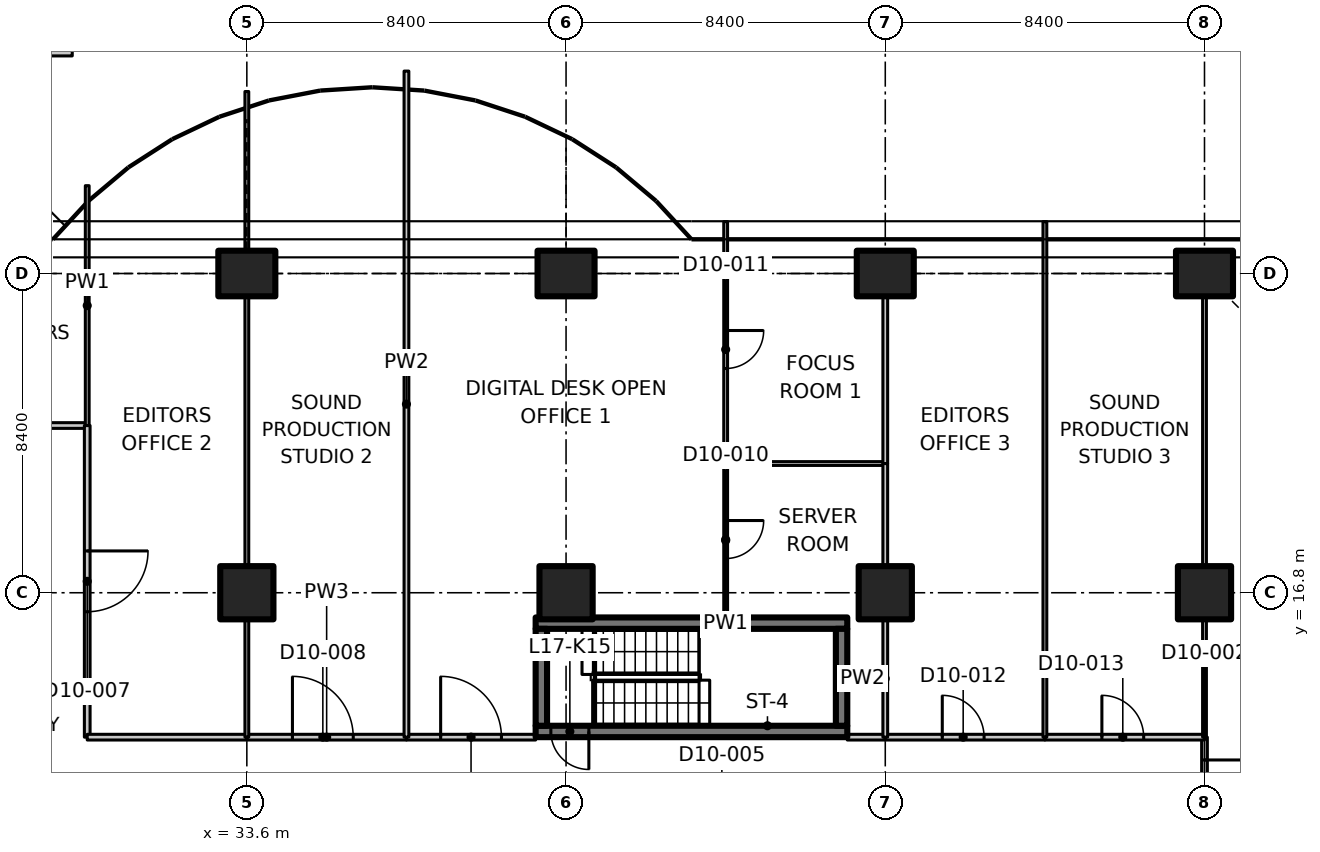
"""IFC4 building model, lengths in metres.
Left out: names, types, materials, properties, quantities, classifications, styles, units other than length and angle.
Written with IfcOpenShell. Run it as: python <this file> out.ifc"""

import sys

from ifc_helpers import new_model, si_unit, direction, frame, frame_2d, origin, origin_2d, place, context, subcontext, project, spatial, polyline, rectangle, outline, extrude, element, fill, save


model = new_model("IFC4")
c1 = context("Model", 3, precision=1e-05, world=origin(), true_north=direction((0.0, 1.0)))
c2 = subcontext(c1, "Body", "Model", "MODEL_VIEW")
j1 = project(units=[si_unit("LENGTHUNIT", "METRE"), si_unit("PLANEANGLEUNIT", "RADIAN")], contexts=[c1])
p1 = place(None, origin())
s1 = spatial("IfcSite", under=j1, at=p1, CompositionType="ELEMENT")
p2 = place(p1, origin())
s2 = spatial("IfcBuilding", under=s1, at=p2, CompositionType="ELEMENT")
p3 = place(p2, frame((0.0, 0.0, 76.1)))
s3 = spatial("IfcBuildingStorey", under=s2, at=p3, CompositionType="ELEMENT", Elevation=76.1)
p4 = place(p3, frame((33.6, 16.8, 0.0), z_axis=(0.0, 0.0, 1.0), x_axis=(1.0, 0.0, 0.0)))
e1 = element("IfcColumn", 1, at=p4, inside=s3, PredefinedType="COLUMN", context=c2, shape_type="SweptSolid", body=[
    extrude(rectangle(XDim=1.4, YDim=1.4, at=origin_2d()), origin(), (0.0, 0.0, 1.0), 3.35),
])
p5 = place(p3, frame((33.6, 25.2, 0.0), z_axis=(0.0, 0.0, 1.0), x_axis=(0.0, 1.0, 0.0)))
e2 = element("IfcColumn", 2, at=p5, inside=s3, PredefinedType="COLUMN", context=c2, shape_type="SweptSolid", body=[
    extrude(rectangle(XDim=1.2, YDim=1.5, at=origin_2d()), origin(), (0.0, 0.0, 1.0), 3.35),
])
p6 = place(p3, frame((42.0, 16.8, 0.0), z_axis=(0.0, 0.0, 1.0), x_axis=(1.0, 0.0, 0.0)))
e3 = element("IfcColumn", 3, at=p6, inside=s3, PredefinedType="COLUMN", context=c2, shape_type="SweptSolid", body=[
    extrude(rectangle(XDim=1.4, YDim=1.4, at=origin_2d()), origin(), (0.0, 0.0, 1.0), 3.35),
])
p7 = place(p3, frame((42.0, 25.2, 0.0), z_axis=(0.0, 0.0, 1.0), x_axis=(0.0, 1.0, 0.0)))
e4 = element("IfcColumn", 4, at=p7, inside=s3, PredefinedType="COLUMN", context=c2, shape_type="SweptSolid", body=[
    extrude(rectangle(XDim=1.2, YDim=1.5, at=origin_2d()), origin(), (0.0, 0.0, 1.0), 3.35),
])
p8 = place(p3, frame((50.4, 16.8, 0.0), z_axis=(0.0, 0.0, 1.0), x_axis=(1.0, 0.0, 0.0)))
e5 = element("IfcColumn", 5, at=p8, inside=s3, PredefinedType="COLUMN", context=c2, shape_type="SweptSolid", body=[
    extrude(rectangle(XDim=1.4, YDim=1.4, at=origin_2d()), origin(), (0.0, 0.0, 1.0), 3.35),
])
p9 = place(p3, frame((50.4, 25.2, 0.0), z_axis=(0.0, 0.0, 1.0), x_axis=(0.0, 1.0, 0.0)))
e6 = element("IfcColumn", 6, at=p9, inside=s3, PredefinedType="COLUMN", context=c2, shape_type="SweptSolid", body=[
    extrude(rectangle(XDim=1.2, YDim=1.5, at=origin_2d()), origin(), (0.0, 0.0, 1.0), 3.35),
])
p10 = place(p3, frame((58.8, 16.8, 0.0), z_axis=(0.0, 0.0, 1.0), x_axis=(1.0, 0.0, 0.0)))
e7 = element("IfcColumn", 7, at=p10, inside=s3, PredefinedType="COLUMN", context=c2, shape_type="SweptSolid", body=[
    extrude(rectangle(XDim=1.4, YDim=1.4, at=origin_2d()), origin(), (0.0, 0.0, 1.0), 3.35),
])
p11 = place(p3, frame((58.8, 25.2, 0.0), z_axis=(0.0, 0.0, 1.0), x_axis=(0.0, 1.0, 0.0)))
e8 = element("IfcColumn", 8, at=p11, inside=s3, PredefinedType="COLUMN", context=c2, shape_type="SweptSolid", body=[
    extrude(rectangle(XDim=1.2, YDim=1.5, at=origin_2d()), origin(), (0.0, 0.0, 1.0), 3.35),
])
p12 = place(p3, frame((49.4, 13.15, 0.0), z_axis=(0.0, 0.0, 1.0), x_axis=(-1.0, 0.0, 0.0)))
e9 = element("IfcWall", 9, at=p12, inside=s3, PredefinedType="SHEAR", context=c2, shape_type="SweptSolid", body=[
    extrude(rectangle(XDim=8.2, YDim=0.3, at=frame_2d((4.1, 0.0))), origin(), (0.0, 0.0, 1.0), 3.35),
])
p13 = place(p12, frame((6.8, 0.0, 0.0)))
e10 = element("IfcOpeningElement", 10, at=p13, cuts=e9, PredefinedType="OPENING", context=c2, shape_type="SweptSolid", body=[
    extrude(rectangle(XDim=1.0, YDim=2.1, at=frame_2d((0.5, 1.05))), frame((0.0, 0.16, 0.0), z_axis=(0.0, -1.0, 0.0), x_axis=(1.0, 0.0, 0.0)), (0.0, 0.0, 1.0), 0.32),
])
p14 = place(p3, frame((41.2, 16.0, 0.0), z_axis=(0.0, 0.0, 1.0), x_axis=(1.0, 0.0, 0.0)))
e11 = element("IfcWall", 11, at=p14, inside=s3, PredefinedType="SHEAR", context=c2, shape_type="SweptSolid", body=[
    extrude(rectangle(XDim=8.2, YDim=0.3, at=frame_2d((4.1, 0.0))), origin(), (0.0, 0.0, 1.0), 3.35),
])
for number, where, z_axis, x_axis in (
    (12, (41.35, 13.3, 0.0), (0.0, 0.0, 1.0), (0.0, 1.0, 0.0)),
    (13, (49.25, 13.3, 0.0), (0.0, 0.0, 1.0), (0.0, 1.0, 0.0)),
):
    element("IfcWall", number, at=place(p3, frame(where, z_axis=z_axis, x_axis=x_axis)), inside=s3, PredefinedType="SHEAR", context=c2, shape_type="SweptSolid", body=[
        extrude(rectangle(XDim=2.55, YDim=0.3, at=frame_2d((1.275, 0.0))), origin(), (0.0, 0.0, 1.0), 3.35),
    ])
p15 = place(p3, frame((25.2, 21.2, 0.0), z_axis=(0.0, 0.0, 1.0), x_axis=(1.0, 0.0, 0.0)))
e14 = element("IfcWall", 14, at=p15, inside=s3, PredefinedType="PARTITIONING", context=c2, shape_type="SweptSolid", body=[
    extrude(rectangle(XDim=4.2, YDim=0.15, at=frame_2d((2.1, 0.0))), origin(), (0.0, 0.0, 1.0), 3.33),
])
p16 = place(p3, frame((29.4, 21.2, 0.0), z_axis=(0.0, 0.0, 1.0), x_axis=(0.0, -1.0, 0.0)))
e15 = element("IfcWall", 15, at=p16, inside=s3, PredefinedType="PARTITIONING", context=c2, shape_type="SweptSolid", body=[
    extrude(rectangle(XDim=8.2, YDim=0.15, at=frame_2d((4.1, 0.0))), origin(), (0.0, 0.0, 1.0), 3.33),
])
p17 = place(p16, frame((3.3, 0.0, 0.0)))
e16 = element("IfcOpeningElement", 16, at=p17, cuts=e15, PredefinedType="OPENING", context=c2, shape_type="SweptSolid", body=[
    extrude(rectangle(XDim=1.6, YDim=2.1, at=frame_2d((0.8, 1.05))), frame((0.0, 0.085, 0.0), z_axis=(0.0, -1.0, 0.0), x_axis=(1.0, 0.0, 0.0)), (0.0, 0.0, 1.0), 0.17),
])
p18 = place(p3, frame((29.4, 27.511, 0.0), z_axis=(0.0, 0.0, 1.0), x_axis=(0.0, -1.0, 0.0)))
e17 = element("IfcWall", 17, at=p18, inside=s3, PredefinedType="PARTITIONING", context=c2, shape_type="SweptSolid", body=[
    extrude(outline(polyline([(0.0, 0.0), (6.311, 0.0), (6.311, 3.33), (2.761, 3.33), (2.759, 2.98), (1.863, 2.98), (1.861, 3.33), (0.236, 3.33), (0.0, 3.33), (0.0, 0.0)])), frame((0.0, 0.05, 0.0), z_axis=(0.0, -1.0, 0.0), x_axis=(1.0, 0.0, 0.0)), (0.0, 0.0, 1.0), 0.1),
])
p19 = place(p3, frame((25.2, 31.0, 0.0), z_axis=(0.0, 0.0, 1.0), x_axis=(1.0, 0.0, 0.0)))
e18 = element("IfcWall", 18, at=p19, inside=s3, PredefinedType="PARTITIONING", context=c2, shape_type="SweptSolid", body=[
    extrude(rectangle(XDim=3.806, YDim=0.15, at=frame_2d((1.903, 0.0))), origin(), (0.0, 0.0, 1.0), 2.98),
])
p20 = place(p3, frame((58.8, 13.0, 0.0), z_axis=(0.0, 0.0, 1.0), x_axis=(0.0, -1.0, 0.0)))
e19 = element("IfcWall", 19, at=p20, inside=s3, PredefinedType="PARTITIONING", context=c2, shape_type="SweptSolid", body=[
    extrude(rectangle(XDim=3.4, YDim=0.15, at=frame_2d((1.7, 0.0))), origin(), (0.0, 0.0, 1.0), 3.33),
])
p21 = place(p20, frame((0.6, 0.0, 0.0)))
e20 = element("IfcOpeningElement", 20, at=p21, cuts=e19, PredefinedType="OPENING", context=c2, shape_type="SweptSolid", body=[
    extrude(rectangle(XDim=2.0, YDim=2.4, at=frame_2d((1.0, 1.2))), frame((0.0, 0.085, 0.0), z_axis=(0.0, -1.0, 0.0), x_axis=(1.0, 0.0, 0.0)), (0.0, 0.0, 1.0), 0.17),
])
p22 = place(p3, frame((29.4, 13.0, 0.0), z_axis=(0.0, 0.0, 1.0), x_axis=(1.0, 0.0, 0.0)))
e21 = element("IfcWall", 21, at=p22, inside=s3, PredefinedType="PARTITIONING", context=c2, shape_type="SweptSolid", body=[
    extrude(rectangle(XDim=4.2, YDim=0.15, at=frame_2d((2.1, 0.0))), origin(), (0.0, 0.0, 1.0), 3.33),
])
p23 = place(p3, frame((33.6, 13.0, 0.0), z_axis=(0.0, 0.0, 1.0), x_axis=(1.0, 0.0, 0.0)))
e22 = element("IfcWall", 22, at=p23, inside=s3, PredefinedType="PARTITIONING", context=c2, shape_type="SweptSolid", body=[
    extrude(rectangle(XDim=4.2, YDim=0.15, at=frame_2d((2.1, 0.0))), origin(), (0.0, 0.0, 1.0), 3.33),
])
p24 = place(p23, frame((1.2, 0.0, 0.0)))
e23 = element("IfcOpeningElement", 23, at=p24, cuts=e22, PredefinedType="OPENING", context=c2, shape_type="SweptSolid", body=[
    extrude(rectangle(XDim=1.6, YDim=2.1, at=frame_2d((0.8, 1.05))), frame((0.0, 0.085, 0.0), z_axis=(0.0, -1.0, 0.0), x_axis=(1.0, 0.0, 0.0)), (0.0, 0.0, 1.0), 0.17),
])
p25 = place(p3, frame((37.8, 13.0, 0.0), z_axis=(0.0, 0.0, 1.0), x_axis=(1.0, 0.0, 0.0)))
e24 = element("IfcWall", 24, at=p25, inside=s3, PredefinedType="PARTITIONING", context=c2, shape_type="SweptSolid", body=[
    extrude(rectangle(XDim=3.4, YDim=0.15, at=frame_2d((1.7, 0.0))), origin(), (0.0, 0.0, 1.0), 3.33),
])
p26 = place(p25, frame((0.9, 0.0, 0.0)))
e25 = element("IfcOpeningElement", 25, at=p26, cuts=e24, PredefinedType="OPENING", context=c2, shape_type="SweptSolid", body=[
    extrude(rectangle(XDim=1.6, YDim=2.1, at=frame_2d((0.8, 1.05))), frame((0.0, 0.085, 0.0), z_axis=(0.0, -1.0, 0.0), x_axis=(1.0, 0.0, 0.0)), (0.0, 0.0, 1.0), 0.17),
])
p27 = place(p3, frame((49.4, 13.0, 0.0), z_axis=(0.0, 0.0, 1.0), x_axis=(1.0, 0.0, 0.0)))
e26 = element("IfcWall", 26, at=p27, inside=s3, PredefinedType="PARTITIONING", context=c2, shape_type="SweptSolid", body=[
    extrude(rectangle(XDim=1.0, YDim=0.15, at=frame_2d((0.5, 0.0))), origin(), (0.0, 0.0, 1.0), 3.33),
])
p28 = place(p3, frame((50.4, 13.0, 0.0), z_axis=(0.0, 0.0, 1.0), x_axis=(1.0, 0.0, 0.0)))
e27 = element("IfcWall", 27, at=p28, inside=s3, PredefinedType="PARTITIONING", context=c2, shape_type="SweptSolid", body=[
    extrude(rectangle(XDim=4.2, YDim=0.15, at=frame_2d((2.1, 0.0))), origin(), (0.0, 0.0, 1.0), 3.33),
])
p29 = place(p28, frame((1.5, 0.0, 0.0)))
e28 = element("IfcOpeningElement", 28, at=p29, cuts=e27, PredefinedType="OPENING", context=c2, shape_type="SweptSolid", body=[
    extrude(rectangle(XDim=1.1, YDim=2.1, at=frame_2d((0.55, 1.05))), frame((0.0, 0.085, 0.0), z_axis=(0.0, -1.0, 0.0), x_axis=(1.0, 0.0, 0.0)), (0.0, 0.0, 1.0), 0.17),
])
p30 = place(p3, frame((54.6, 13.0, 0.0), z_axis=(0.0, 0.0, 1.0), x_axis=(1.0, 0.0, 0.0)))
e29 = element("IfcWall", 29, at=p30, inside=s3, PredefinedType="PARTITIONING", context=c2, shape_type="SweptSolid", body=[
    extrude(rectangle(XDim=4.2, YDim=0.15, at=frame_2d((2.1, 0.0))), origin(), (0.0, 0.0, 1.0), 3.33),
])
p31 = place(p30, frame((1.5, 0.0, 0.0)))
e30 = element("IfcOpeningElement", 30, at=p31, cuts=e29, PredefinedType="OPENING", context=c2, shape_type="SweptSolid", body=[
    extrude(rectangle(XDim=1.1, YDim=2.1, at=frame_2d((0.55, 1.05))), frame((0.0, 0.085, 0.0), z_axis=(0.0, -1.0, 0.0), x_axis=(1.0, 0.0, 0.0)), (0.0, 0.0, 1.0), 0.17),
])
p32 = place(p3, frame((58.8, 13.0, 0.0), z_axis=(0.0, 0.0, 1.0), x_axis=(0.0, 1.0, 0.0)))
e31 = element("IfcWall", 31, at=p32, inside=s3, PredefinedType="PARTITIONING", context=c2, shape_type="SweptSolid", body=[
    extrude(rectangle(XDim=3.08, YDim=0.1, at=frame_2d((1.54, 0.0))), origin(), (0.0, 0.0, 1.0), 3.33),
])
p33 = place(p3, frame((58.8, 17.52, 0.0), z_axis=(0.0, 0.0, 1.0), x_axis=(0.0, 1.0, 0.0)))
e32 = element("IfcWall", 32, at=p33, inside=s3, PredefinedType="PARTITIONING", context=c2, shape_type="SweptSolid", body=[
    extrude(rectangle(XDim=7.06, YDim=0.1, at=frame_2d((3.53, 0.0))), origin(), (0.0, 0.0, 1.0), 3.33),
])
p34 = place(p3, frame((33.6, 29.988, 0.0), z_axis=(0.0, 0.0, 1.0), x_axis=(0.0, -1.0, 0.0)))
e33 = element("IfcWall", 33, at=p34, inside=s3, PredefinedType="PARTITIONING", context=c2, shape_type="SweptSolid", body=[
    extrude(rectangle(XDim=4.168, YDim=0.1, at=frame_2d((2.084, 0.0))), origin(), (0.0, 0.0, 1.0), 2.98),
])
p35 = place(p3, frame((33.6, 24.58, 0.0), z_axis=(0.0, 0.0, 1.0), x_axis=(0.0, -1.0, 0.0)))
e34 = element("IfcWall", 34, at=p35, inside=s3, PredefinedType="PARTITIONING", context=c2, shape_type="SweptSolid", body=[
    extrude(rectangle(XDim=7.06, YDim=0.1, at=frame_2d((3.53, 0.0))), origin(), (0.0, 0.0, 1.0), 3.33),
])
p36 = place(p3, frame((33.6, 16.08, 0.0), z_axis=(0.0, 0.0, 1.0), x_axis=(0.0, -1.0, 0.0)))
e35 = element("IfcWall", 35, at=p36, inside=s3, PredefinedType="PARTITIONING", context=c2, shape_type="SweptSolid", body=[
    extrude(rectangle(XDim=3.08, YDim=0.1, at=frame_2d((1.54, 0.0))), origin(), (0.0, 0.0, 1.0), 3.33),
])
p37 = place(p3, frame((37.8, 30.526, 0.0), z_axis=(0.0, 0.0, 1.0), x_axis=(0.0, -1.0, 0.0)))
e36 = element("IfcWall", 36, at=p37, inside=s3, PredefinedType="PARTITIONING", context=c2, shape_type="SweptSolid", body=[
    extrude(outline(polyline([(0.0, 0.0), (17.526, 0.0), (17.526, 3.33), (5.776, 3.33), (5.774, 2.98), (4.878, 2.98), (4.876, 3.33), (0.283, 3.33), (0.0, 3.33), (0.0, 0.0)])), frame((0.0, 0.062, 0.0), z_axis=(0.0, -1.0, 0.0), x_axis=(1.0, 0.0, 0.0)), (0.0, 0.0, 1.0), 0.125),
])
p38 = place(p3, frame((46.2, 20.2, 0.0), z_axis=(0.0, 0.0, 1.0), x_axis=(0.0, -1.0, 0.0)))
e37 = element("IfcWall", 37, at=p38, inside=s3, PredefinedType="PARTITIONING", context=c2, shape_type="SweptSolid", body=[
    extrude(rectangle(XDim=4.05, YDim=0.1, at=frame_2d((2.025, 0.0))), origin(), (0.0, 0.0, 1.0), 3.33),
])
p39 = place(p38, frame((1.5, 0.0, 0.0)))
e38 = element("IfcOpeningElement", 38, at=p39, cuts=e37, PredefinedType="OPENING", context=c2, shape_type="SweptSolid", body=[
    extrude(rectangle(XDim=1.0, YDim=2.1, at=frame_2d((0.5, 1.05))), frame((0.0, 0.06, 0.0), z_axis=(0.0, -1.0, 0.0), x_axis=(1.0, 0.0, 0.0)), (0.0, 0.0, 1.0), 0.12),
])
p40 = place(p3, frame((46.2, 26.565, 0.0), z_axis=(0.0, 0.0, 1.0), x_axis=(0.0, -1.0, 0.0)))
e39 = element("IfcWall", 39, at=p40, inside=s3, PredefinedType="PARTITIONING", context=c2, shape_type="SweptSolid", body=[
    extrude(outline(polyline([(0.0, 0.0), (6.365, 0.0), (6.365, 3.33), (1.815, 3.33), (1.813, 2.98), (0.917, 2.98), (0.915, 3.33), (0.265, 3.33), (0.0, 3.33), (0.0, 0.0)])), frame((0.0, 0.05, 0.0), z_axis=(0.0, -1.0, 0.0), x_axis=(1.0, 0.0, 0.0)), (0.0, 0.0, 1.0), 0.1),
])
p41 = place(p40, frame((2.865, 0.0, 0.0)))
e40 = element("IfcOpeningElement", 40, at=p41, cuts=e39, PredefinedType="OPENING", context=c2, shape_type="SweptSolid", body=[
    extrude(rectangle(XDim=1.0, YDim=2.1, at=frame_2d((0.5, 1.05))), frame((0.0, 0.06, 0.0), z_axis=(0.0, -1.0, 0.0), x_axis=(1.0, 0.0, 0.0)), (0.0, 0.0, 1.0), 0.12),
])
p42 = place(p3, frame((46.2, 20.2, 0.0), z_axis=(0.0, 0.0, 1.0), x_axis=(1.0, 0.0, 0.0)))
e41 = element("IfcWall", 41, at=p42, inside=s3, PredefinedType="PARTITIONING", context=c2, shape_type="SweptSolid", body=[
    extrude(rectangle(XDim=4.2, YDim=0.1, at=frame_2d((2.1, 0.0))), origin(), (0.0, 0.0, 1.0), 3.33),
])
p43 = place(p3, frame((50.4, 20.2, 0.0), z_axis=(0.0, 0.0, 1.0), x_axis=(0.0, -1.0, 0.0)))
e42 = element("IfcWall", 42, at=p43, inside=s3, PredefinedType="PARTITIONING", context=c2, shape_type="SweptSolid", body=[
    extrude(rectangle(XDim=2.68, YDim=0.125, at=frame_2d((1.34, 0.0))), origin(), (0.0, 0.0, 1.0), 3.33),
])
p44 = place(p3, frame((50.4, 16.08, 0.0), z_axis=(0.0, 0.0, 1.0), x_axis=(0.0, -1.0, 0.0)))
e43 = element("IfcWall", 43, at=p44, inside=s3, PredefinedType="PARTITIONING", context=c2, shape_type="SweptSolid", body=[
    extrude(rectangle(XDim=3.08, YDim=0.125, at=frame_2d((1.54, 0.0))), origin(), (0.0, 0.0, 1.0), 3.33),
])
p45 = place(p3, frame((50.4, 24.58, 0.0), z_axis=(0.0, 0.0, 1.0), x_axis=(0.0, -1.0, 0.0)))
e44 = element("IfcWall", 44, at=p45, inside=s3, PredefinedType="PARTITIONING", context=c2, shape_type="SweptSolid", body=[
    extrude(rectangle(XDim=4.38, YDim=0.125, at=frame_2d((2.19, 0.0))), origin(), (0.0, 0.0, 1.0), 3.33),
])
p46 = place(p3, frame((54.6, 26.565, 0.0), z_axis=(0.0, 0.0, 1.0), x_axis=(0.0, -1.0, 0.0)))
e45 = element("IfcWall", 45, at=p46, inside=s3, PredefinedType="PARTITIONING", context=c2, shape_type="SweptSolid", body=[
    extrude(outline(polyline([(0.0, 0.0), (13.565, 0.0), (13.565, 3.33), (1.815, 3.33), (1.813, 2.98), (0.917, 2.98), (0.915, 3.33), (0.265, 3.33), (0.0, 3.33), (0.0, 0.0)])), frame((0.0, 0.05, 0.0), z_axis=(0.0, -1.0, 0.0), x_axis=(1.0, 0.0, 0.0)), (0.0, 0.0, 1.0), 0.1),
])
p47 = place(p13, origin())
e46 = element("IfcDoor", 46, at=p47, inside=s3, OperationType="SINGLE_SWING_LEFT", PredefinedType="DOOR", context=c2, shape_type="SweptSolid", body=[
    extrude(rectangle(XDim=1.0, YDim=2.1, at=frame_2d((0.5, 1.05))), frame((0.0, 0.025, 0.0), z_axis=(0.0, -1.0, 0.0), x_axis=(1.0, 0.0, 0.0)), (0.0, 0.0, 1.0), 0.05),
])
fill(e10, e46)
p48 = place(p21, origin())
e47 = element("IfcDoor", 47, at=p48, inside=s3, OperationType="DOUBLE_DOOR_SINGLE_SWING", PredefinedType="DOOR", context=c2, shape_type="SweptSolid", body=[
    extrude(rectangle(XDim=2.0, YDim=2.4, at=frame_2d((1.0, 1.2))), frame((0.0, 0.025, 0.0), z_axis=(0.0, -1.0, 0.0), x_axis=(1.0, 0.0, 0.0)), (0.0, 0.0, 1.0), 0.05),
])
fill(e20, e47)
p49 = place(p17, origin())
e48 = element("IfcDoor", 48, at=p49, inside=s3, OperationType="DOUBLE_DOOR_SINGLE_SWING", PredefinedType="DOOR", context=c2, shape_type="SweptSolid", body=[
    extrude(rectangle(XDim=1.6, YDim=2.1, at=frame_2d((0.8, 1.05))), frame((0.0, 0.025, 0.0), z_axis=(0.0, -1.0, 0.0), x_axis=(1.0, 0.0, 0.0)), (0.0, 0.0, 1.0), 0.05),
])
fill(e16, e48)
p50 = place(p24, origin())
e49 = element("IfcDoor", 49, at=p50, inside=s3, OperationType="DOUBLE_DOOR_SINGLE_SWING", PredefinedType="DOOR", context=c2, shape_type="SweptSolid", body=[
    extrude(rectangle(XDim=1.6, YDim=2.1, at=frame_2d((0.8, 1.05))), frame((0.0, 0.025, 0.0), z_axis=(0.0, -1.0, 0.0), x_axis=(1.0, 0.0, 0.0)), (0.0, 0.0, 1.0), 0.05),
])
fill(e23, e49)
p51 = place(p26, origin())
e50 = element("IfcDoor", 50, at=p51, inside=s3, OperationType="DOUBLE_DOOR_SINGLE_SWING", PredefinedType="DOOR", context=c2, shape_type="SweptSolid", body=[
    extrude(rectangle(XDim=1.6, YDim=2.1, at=frame_2d((0.8, 1.05))), frame((0.0, 0.025, 0.0), z_axis=(0.0, -1.0, 0.0), x_axis=(1.0, 0.0, 0.0)), (0.0, 0.0, 1.0), 0.05),
])
fill(e25, e50)
p52 = place(p39, origin())
e51 = element("IfcDoor", 51, at=p52, inside=s3, OperationType="SINGLE_SWING_LEFT", PredefinedType="DOOR", context=c2, shape_type="SweptSolid", body=[
    extrude(rectangle(XDim=1.0, YDim=2.1, at=frame_2d((0.5, 1.05))), frame((0.0, 0.025, 0.0), z_axis=(0.0, -1.0, 0.0), x_axis=(1.0, 0.0, 0.0)), (0.0, 0.0, 1.0), 0.05),
])
fill(e38, e51)
p53 = place(p41, origin())
e52 = element("IfcDoor", 52, at=p53, inside=s3, OperationType="SINGLE_SWING_LEFT", PredefinedType="DOOR", context=c2, shape_type="SweptSolid", body=[
    extrude(rectangle(XDim=1.0, YDim=2.1, at=frame_2d((0.5, 1.05))), frame((0.0, 0.025, 0.0), z_axis=(0.0, -1.0, 0.0), x_axis=(1.0, 0.0, 0.0)), (0.0, 0.0, 1.0), 0.05),
])
fill(e40, e52)
p54 = place(p29, origin())
e53 = element("IfcDoor", 53, at=p54, inside=s3, OperationType="SINGLE_SWING_LEFT", PredefinedType="DOOR", context=c2, shape_type="SweptSolid", body=[
    extrude(rectangle(XDim=1.1, YDim=2.1, at=frame_2d((0.55, 1.05))), frame((0.0, 0.025, 0.0), z_axis=(0.0, -1.0, 0.0), x_axis=(1.0, 0.0, 0.0)), (0.0, 0.0, 1.0), 0.05),
])
fill(e28, e53)
p55 = place(p31, origin())
e54 = element("IfcDoor", 54, at=p55, inside=s3, OperationType="SINGLE_SWING_LEFT", PredefinedType="DOOR", context=c2, shape_type="SweptSolid", body=[
    extrude(rectangle(XDim=1.1, YDim=2.1, at=frame_2d((0.55, 1.05))), frame((0.0, 0.025, 0.0), z_axis=(0.0, -1.0, 0.0), x_axis=(1.0, 0.0, 0.0)), (0.0, 0.0, 1.0), 0.05),
])
fill(e30, e54)
save(model, sys.argv[1])
